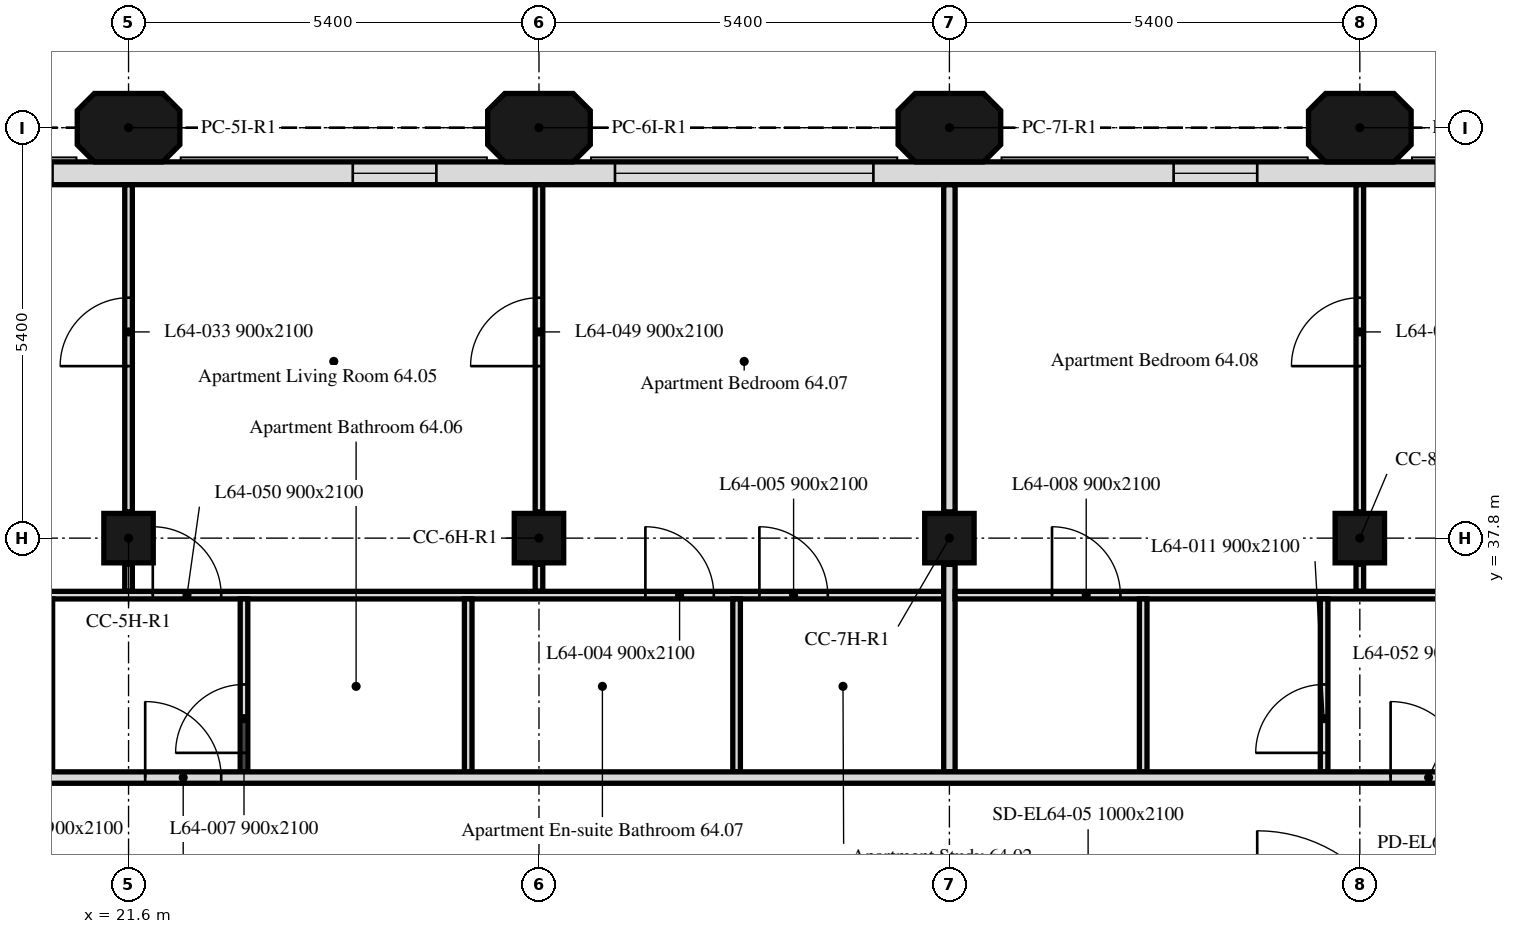
"""IFC4 building model, lengths in metres.
Left out: names, types, materials, properties, quantities, classifications, styles, units other than length and angle.
Written with IfcOpenShell. Run it as: python <this file> out.ifc"""

import sys

from ifc_helpers import new_model, si_unit, direction, frame, frame_2d, origin, origin_2d, place, context, subcontext, project, spatial, polyline, rectangle, outline, extrude, element, fill, save


model = new_model("IFC4")
c1 = context("Model", 3, precision=1e-05, world=origin(), true_north=direction((0.0, 1.0)))
c2 = subcontext(c1, "Body", "Model", "MODEL_VIEW")
j1 = project(units=[si_unit("LENGTHUNIT", "METRE"), si_unit("PLANEANGLEUNIT", "RADIAN")], contexts=[c1])
p1 = place(None, origin())
s1 = spatial("IfcSite", under=j1, at=p1, CompositionType="ELEMENT")
p2 = place(p1, origin())
s2 = spatial("IfcBuilding", under=s1, at=p2, CompositionType="ELEMENT")
p3 = place(p2, frame((0.0, 0.0, 265.3)))
s3 = spatial("IfcBuildingStorey", under=s2, at=p3, CompositionType="ELEMENT", Elevation=265.3)
for number, where, z_axis, x_axis in (
    (1, (21.6, 37.8, 0.0), (0.0, 0.0, 1.0), (1.0, 0.0, 0.0)),
    (2, (27.0, 37.8, 0.0), (0.0, 0.0, 1.0), (1.0, 0.0, 0.0)),
    (3, (32.4, 37.8, 0.0), (0.0, 0.0, 1.0), (1.0, 0.0, 0.0)),
    (4, (37.8, 37.8, 0.0), (0.0, 0.0, 1.0), (1.0, 0.0, 0.0)),
):
    element("IfcColumn", number, at=place(p3, frame(where, z_axis=z_axis, x_axis=x_axis)), inside=s3, PredefinedType="COLUMN", context=c2, shape_type="SweptSolid", body=[
        extrude(rectangle(XDim=0.65, YDim=0.65, at=origin_2d()), origin(), (0.0, 0.0, 1.0), 3.0),
    ])
for number, where, z_axis, x_axis in (
    (5, (21.6, 43.2, 0.0), (0.0, 0.0, 1.0), (1.0, 0.0, 0.0)),
    (6, (27.0, 43.2, 0.0), (0.0, 0.0, 1.0), (1.0, 0.0, 0.0)),
    (7, (32.4, 43.2, 0.0), (0.0, 0.0, 1.0), (1.0, 0.0, 0.0)),
    (8, (37.8, 43.2, 0.0), (0.0, 0.0, 1.0), (1.0, 0.0, 0.0)),
):
    element("IfcColumn", number, at=place(p3, frame(where, z_axis=z_axis, x_axis=x_axis)), inside=s3, PredefinedType="COLUMN", context=c2, shape_type="SweptSolid", body=[
        extrude(outline(polyline([(-0.45, -0.45), (0.45, -0.45), (0.675, -0.225), (0.675, 0.225), (0.45, 0.45), (-0.45, 0.45), (-0.675, 0.225), (-0.675, -0.225), (-0.45, -0.45)])), origin(), (0.0, 0.0, 1.0), 3.0),
    ])
p4 = place(p3, frame((43.014, 42.6, 0.0), z_axis=(0.0, 0.0, 1.0), x_axis=(-1.0, 0.0, 0.0)))
e9 = element("IfcWall", 9, at=p4, inside=s3, PredefinedType="SOLIDWALL", context=c2, shape_type="SweptSolid", body=[
    extrude(rectangle(XDim=32.027, YDim=0.3, at=frame_2d((16.014, 0.0))), origin(), (0.0, 0.0, 1.0), 3.0),
])
p5 = place(p4, frame((0.814, 0.0, 0.9)))
e10 = element("IfcOpeningElement", 10, at=p5, cuts=e9, PredefinedType="OPENING", context=c2, shape_type="SweptSolid", body=[
    extrude(rectangle(XDim=3.4, YDim=1.7, at=frame_2d((1.7, 0.85))), frame((0.0, 0.16, 0.0), z_axis=(0.0, -1.0, 0.0), x_axis=(1.0, 0.0, 0.0)), (0.0, 0.0, 1.0), 0.32),
])
p6 = place(p4, frame((6.564, 0.0, 0.9)))
e11 = element("IfcOpeningElement", 11, at=p6, cuts=e9, PredefinedType="OPENING", context=c2, shape_type="SweptSolid", body=[
    extrude(rectangle(XDim=1.1, YDim=1.7, at=frame_2d((0.55, 0.85))), frame((0.0, 0.16, 0.0), z_axis=(0.0, -1.0, 0.0), x_axis=(1.0, 0.0, 0.0)), (0.0, 0.0, 1.0), 0.32),
])
p7 = place(p4, frame((11.614, 0.0, 0.9)))
e12 = element("IfcOpeningElement", 12, at=p7, cuts=e9, PredefinedType="OPENING", context=c2, shape_type="SweptSolid", body=[
    extrude(rectangle(XDim=3.4, YDim=1.7, at=frame_2d((1.7, 0.85))), frame((0.0, 0.16, 0.0), z_axis=(0.0, -1.0, 0.0), x_axis=(1.0, 0.0, 0.0)), (0.0, 0.0, 1.0), 0.32),
])
p8 = place(p4, frame((17.364, 0.0, 0.9)))
e13 = element("IfcOpeningElement", 13, at=p8, cuts=e9, PredefinedType="OPENING", context=c2, shape_type="SweptSolid", body=[
    extrude(rectangle(XDim=1.1, YDim=1.7, at=frame_2d((0.55, 0.85))), frame((0.0, 0.16, 0.0), z_axis=(0.0, -1.0, 0.0), x_axis=(1.0, 0.0, 0.0)), (0.0, 0.0, 1.0), 0.32),
])
p9 = place(p4, frame((22.414, 0.0, 0.9)))
e14 = element("IfcOpeningElement", 14, at=p9, cuts=e9, PredefinedType="OPENING", context=c2, shape_type="SweptSolid", body=[
    extrude(rectangle(XDim=3.4, YDim=1.7, at=frame_2d((1.7, 0.85))), frame((0.0, 0.16, 0.0), z_axis=(0.0, -1.0, 0.0), x_axis=(1.0, 0.0, 0.0)), (0.0, 0.0, 1.0), 0.32),
])
p10 = place(p4, frame((28.164, 0.0, 0.9)))
e15 = element("IfcOpeningElement", 15, at=p10, cuts=e9, PredefinedType="OPENING", context=c2, shape_type="SweptSolid", body=[
    extrude(rectangle(XDim=1.1, YDim=1.7, at=frame_2d((0.55, 0.85))), frame((0.0, 0.16, 0.0), z_axis=(0.0, -1.0, 0.0), x_axis=(1.0, 0.0, 0.0)), (0.0, 0.0, 1.0), 0.32),
])
p11 = place(p3, frame((21.6, 37.1, 0.0), z_axis=(0.0, 0.0, 1.0), x_axis=(0.0, 1.0, 0.0)))
e16 = element("IfcWall", 16, at=p11, inside=s3, PredefinedType="PARTITIONING", context=c2, shape_type="SweptSolid", body=[
    extrude(rectangle(XDim=0.355, YDim=0.1, at=frame_2d((0.177, 0.0))), origin(), (0.0, 0.0, 1.0), 3.0),
])
p12 = place(p3, frame((21.6, 38.145, 0.0), z_axis=(0.0, 0.0, 1.0), x_axis=(0.0, 1.0, 0.0)))
e17 = element("IfcWall", 17, at=p12, inside=s3, PredefinedType="PARTITIONING", context=c2, shape_type="SweptSolid", body=[
    extrude(rectangle(XDim=4.304, YDim=0.1, at=frame_2d((2.152, 0.0))), origin(), (0.0, 0.0, 1.0), 3.0),
])
p13 = place(p12, frame((1.918, 0.0, 0.0)))
e18 = element("IfcOpeningElement", 18, at=p13, cuts=e17, PredefinedType="OPENING", context=c2, shape_type="SweptSolid", body=[
    extrude(rectangle(XDim=0.9, YDim=2.1, at=frame_2d((0.45, 1.05))), frame((0.0, 0.05, 0.0), z_axis=(0.0, -1.0, 0.0), x_axis=(1.0, 0.0, 0.0)), (0.0, 0.0, 1.0), 0.1),
])
p14 = place(p3, frame((27.0, 37.1, 0.0), z_axis=(0.0, 0.0, 1.0), x_axis=(0.0, 1.0, 0.0)))
e19 = element("IfcWall", 19, at=p14, inside=s3, PredefinedType="PARTITIONING", context=c2, shape_type="SweptSolid", body=[
    extrude(rectangle(XDim=0.355, YDim=0.1, at=frame_2d((0.177, 0.0))), origin(), (0.0, 0.0, 1.0), 3.0),
])
p15 = place(p3, frame((27.0, 38.145, 0.0), z_axis=(0.0, 0.0, 1.0), x_axis=(0.0, 1.0, 0.0)))
e20 = element("IfcWall", 20, at=p15, inside=s3, PredefinedType="PARTITIONING", context=c2, shape_type="SweptSolid", body=[
    extrude(rectangle(XDim=4.304, YDim=0.1, at=frame_2d((2.152, 0.0))), origin(), (0.0, 0.0, 1.0), 3.0),
])
p16 = place(p15, frame((1.918, 0.0, 0.0)))
e21 = element("IfcOpeningElement", 21, at=p16, cuts=e20, PredefinedType="OPENING", context=c2, shape_type="SweptSolid", body=[
    extrude(rectangle(XDim=0.9, YDim=2.1, at=frame_2d((0.45, 1.05))), frame((0.0, 0.05, 0.0), z_axis=(0.0, -1.0, 0.0), x_axis=(1.0, 0.0, 0.0)), (0.0, 0.0, 1.0), 0.1),
])
p17 = place(p3, frame((32.4, 38.145, 0.0), z_axis=(0.0, 0.0, 1.0), x_axis=(0.0, 1.0, 0.0)))
e22 = element("IfcWall", 22, at=p17, inside=s3, PredefinedType="PARTITIONING", context=c2, shape_type="SweptSolid", body=[
    extrude(rectangle(XDim=4.304, YDim=0.15, at=frame_2d((2.152, 0.0))), origin(), (0.0, 0.0, 1.0), 3.0),
])
p18 = place(p3, frame((16.275, 37.05, 0.0), z_axis=(0.0, 0.0, 1.0), x_axis=(1.0, 0.0, 0.0)))
e23 = element("IfcWall", 23, at=p18, inside=s3, PredefinedType="PARTITIONING", context=c2, shape_type="SweptSolid", body=[
    extrude(rectangle(XDim=16.05, YDim=0.1, at=frame_2d((8.025, 0.0))), origin(), (0.0, 0.0, 1.0), 3.0),
])
p19 = place(p18, frame((1.453, 0.0, 0.0)))
e24 = element("IfcOpeningElement", 24, at=p19, cuts=e23, PredefinedType="OPENING", context=c2, shape_type="SweptSolid", body=[
    extrude(rectangle(XDim=0.9, YDim=2.1, at=frame_2d((0.45, 1.05))), frame((0.0, 0.05, 0.0), z_axis=(0.0, -1.0, 0.0), x_axis=(1.0, 0.0, 0.0)), (0.0, 0.0, 1.0), 0.1),
])
p20 = place(p18, frame((12.125, 0.0, 0.0)))
e25 = element("IfcOpeningElement", 25, at=p20, cuts=e23, PredefinedType="OPENING", context=c2, shape_type="SweptSolid", body=[
    extrude(rectangle(XDim=0.9, YDim=2.1, at=frame_2d((0.45, 1.05))), frame((0.0, 0.05, 0.0), z_axis=(0.0, -1.0, 0.0), x_axis=(1.0, 0.0, 0.0)), (0.0, 0.0, 1.0), 0.1),
])
p21 = place(p18, frame((13.625, 0.0, 0.0)))
e26 = element("IfcOpeningElement", 26, at=p21, cuts=e23, PredefinedType="OPENING", context=c2, shape_type="SweptSolid", body=[
    extrude(rectangle(XDim=0.9, YDim=2.1, at=frame_2d((0.45, 1.05))), frame((0.0, 0.05, 0.0), z_axis=(0.0, -1.0, 0.0), x_axis=(1.0, 0.0, 0.0)), (0.0, 0.0, 1.0), 0.1),
])
p22 = place(p18, frame((5.644, 0.0, 0.0)))
e27 = element("IfcOpeningElement", 27, at=p22, cuts=e23, PredefinedType="OPENING", context=c2, shape_type="SweptSolid", body=[
    extrude(rectangle(XDim=0.9, YDim=2.1, at=frame_2d((0.45, 1.05))), frame((0.0, 0.05, 0.0), z_axis=(0.0, -1.0, 0.0), x_axis=(1.0, 0.0, 0.0)), (0.0, 0.0, 1.0), 0.1),
])
p23 = place(p3, frame((20.551, 34.725, 0.0), z_axis=(0.0, 0.0, 1.0), x_axis=(0.0, 1.0, 0.0)))
e28 = element("IfcWall", 28, at=p23, inside=s3, PredefinedType="PARTITIONING", context=c2, shape_type="SweptSolid", body=[
    extrude(rectangle(XDim=2.275, YDim=0.1, at=frame_2d((1.137, 0.0))), origin(), (0.0, 0.0, 1.0), 3.0),
])
p24 = place(p23, frame((0.25, 0.0, 0.0)))
e29 = element("IfcOpeningElement", 29, at=p24, cuts=e28, PredefinedType="OPENING", context=c2, shape_type="SweptSolid", body=[
    extrude(rectangle(XDim=0.9, YDim=2.1, at=frame_2d((0.45, 1.05))), frame((0.0, 0.05, 0.0), z_axis=(0.0, -1.0, 0.0), x_axis=(1.0, 0.0, 0.0)), (0.0, 0.0, 1.0), 0.1),
])
p25 = place(p3, frame((23.119, 34.725, 0.0), z_axis=(0.0, 0.0, 1.0), x_axis=(0.0, 1.0, 0.0)))
e30 = element("IfcWall", 30, at=p25, inside=s3, PredefinedType="PARTITIONING", context=c2, shape_type="SweptSolid", body=[
    extrude(rectangle(XDim=2.275, YDim=0.1, at=frame_2d((1.137, 0.0))), origin(), (0.0, 0.0, 1.0), 3.0),
])
p26 = place(p25, frame((0.25, 0.0, 0.0)))
e31 = element("IfcOpeningElement", 31, at=p26, cuts=e30, PredefinedType="OPENING", context=c2, shape_type="SweptSolid", body=[
    extrude(rectangle(XDim=0.9, YDim=2.1, at=frame_2d((0.45, 1.05))), frame((0.0, 0.05, 0.0), z_axis=(0.0, -1.0, 0.0), x_axis=(1.0, 0.0, 0.0)), (0.0, 0.0, 1.0), 0.1),
])
for number, where, z_axis, x_axis in (
    (32, (26.069, 34.725, 0.0), (0.0, 0.0, 1.0), (0.0, 1.0, 0.0)),
    (33, (29.6, 34.725, 0.0), (0.0, 0.0, 1.0), (0.0, 1.0, 0.0)),
):
    element("IfcWall", number, at=place(p3, frame(where, z_axis=z_axis, x_axis=x_axis)), inside=s3, PredefinedType="PARTITIONING", context=c2, shape_type="SweptSolid", body=[
        extrude(rectangle(XDim=2.275, YDim=0.1, at=frame_2d((1.137, 0.0))), origin(), (0.0, 0.0, 1.0), 3.0),
    ])
p27 = place(p3, frame((32.4, 34.725, 0.0), z_axis=(0.0, 0.0, 1.0), x_axis=(0.0, 1.0, 0.0)))
e34 = element("IfcWall", 34, at=p27, inside=s3, PredefinedType="PARTITIONING", context=c2, shape_type="SweptSolid", body=[
    extrude(rectangle(XDim=2.73, YDim=0.15, at=frame_2d((1.365, 0.0))), origin(), (0.0, 0.0, 1.0), 3.0),
])
p28 = place(p3, frame((37.8, 37.1, 0.0), z_axis=(0.0, 0.0, 1.0), x_axis=(0.0, 1.0, 0.0)))
e35 = element("IfcWall", 35, at=p28, inside=s3, PredefinedType="PARTITIONING", context=c2, shape_type="SweptSolid", body=[
    extrude(rectangle(XDim=0.355, YDim=0.1, at=frame_2d((0.177, 0.0))), origin(), (0.0, 0.0, 1.0), 3.0),
])
p29 = place(p3, frame((37.8, 38.145, 0.0), z_axis=(0.0, 0.0, 1.0), x_axis=(0.0, 1.0, 0.0)))
e36 = element("IfcWall", 36, at=p29, inside=s3, PredefinedType="PARTITIONING", context=c2, shape_type="SweptSolid", body=[
    extrude(rectangle(XDim=4.304, YDim=0.1, at=frame_2d((2.152, 0.0))), origin(), (0.0, 0.0, 1.0), 3.0),
])
p30 = place(p29, frame((1.918, 0.0, 0.0)))
e37 = element("IfcOpeningElement", 37, at=p30, cuts=e36, PredefinedType="OPENING", context=c2, shape_type="SweptSolid", body=[
    extrude(rectangle(XDim=0.9, YDim=2.1, at=frame_2d((0.45, 1.05))), frame((0.0, 0.05, 0.0), z_axis=(0.0, -1.0, 0.0), x_axis=(1.0, 0.0, 0.0)), (0.0, 0.0, 1.0), 0.1),
])
p31 = place(p3, frame((32.475, 37.05, 0.0), z_axis=(0.0, 0.0, 1.0), x_axis=(1.0, 0.0, 0.0)))
e38 = element("IfcWall", 38, at=p31, inside=s3, PredefinedType="PARTITIONING", context=c2, shape_type="SweptSolid", body=[
    extrude(rectangle(XDim=10.485, YDim=0.1, at=frame_2d((5.242, 0.0))), origin(), (0.0, 0.0, 1.0), 3.0),
])
p32 = place(p31, frame((1.275, 0.0, 0.0)))
e39 = element("IfcOpeningElement", 39, at=p32, cuts=e38, PredefinedType="OPENING", context=c2, shape_type="SweptSolid", body=[
    extrude(rectangle(XDim=0.9, YDim=2.1, at=frame_2d((0.45, 1.05))), frame((0.0, 0.05, 0.0), z_axis=(0.0, -1.0, 0.0), x_axis=(1.0, 0.0, 0.0)), (0.0, 0.0, 1.0), 0.1),
])
p33 = place(p31, frame((6.535, 0.0, 0.0)))
e40 = element("IfcOpeningElement", 40, at=p33, cuts=e38, PredefinedType="OPENING", context=c2, shape_type="SweptSolid", body=[
    extrude(rectangle(XDim=0.9, YDim=2.1, at=frame_2d((0.45, 1.05))), frame((0.0, 0.05, 0.0), z_axis=(0.0, -1.0, 0.0), x_axis=(1.0, 0.0, 0.0)), (0.0, 0.0, 1.0), 0.1),
])
p34 = place(p3, frame((34.95, 34.725, 0.0), z_axis=(0.0, 0.0, 1.0), x_axis=(0.0, 1.0, 0.0)))
e41 = element("IfcWall", 41, at=p34, inside=s3, PredefinedType="PARTITIONING", context=c2, shape_type="SweptSolid", body=[
    extrude(rectangle(XDim=2.275, YDim=0.1, at=frame_2d((1.137, 0.0))), origin(), (0.0, 0.0, 1.0), 3.0),
])
p35 = place(p3, frame((37.33, 34.725, 0.0), z_axis=(0.0, 0.0, 1.0), x_axis=(0.0, 1.0, 0.0)))
e42 = element("IfcWall", 42, at=p35, inside=s3, PredefinedType="PARTITIONING", context=c2, shape_type="SweptSolid", body=[
    extrude(rectangle(XDim=2.275, YDim=0.1, at=frame_2d((1.137, 0.0))), origin(), (0.0, 0.0, 1.0), 3.0),
])
p36 = place(p35, frame((0.25, 0.0, 0.0)))
e43 = element("IfcOpeningElement", 43, at=p36, cuts=e42, PredefinedType="OPENING", context=c2, shape_type="SweptSolid", body=[
    extrude(rectangle(XDim=0.9, YDim=2.1, at=frame_2d((0.45, 1.05))), frame((0.0, 0.05, 0.0), z_axis=(0.0, -1.0, 0.0), x_axis=(1.0, 0.0, 0.0)), (0.0, 0.0, 1.0), 0.1),
])
p37 = place(p3, frame((6.151, 34.65, 0.0), z_axis=(0.0, 0.0, 1.0), x_axis=(1.0, 0.0, 0.0)))
e44 = element("IfcWall", 44, at=p37, inside=s3, PredefinedType="PARTITIONING", context=c2, shape_type="SweptSolid", body=[
    extrude(rectangle(XDim=41.698, YDim=0.15, at=frame_2d((20.849, 0.0))), origin(), (0.0, 0.0, 1.0), 3.0),
])
p38 = place(p37, frame((2.969, 0.0, 0.0)))
e45 = element("IfcOpeningElement", 45, at=p38, cuts=e44, PredefinedType="OPENING", context=c2, shape_type="SweptSolid", body=[
    extrude(rectangle(XDim=1.0, YDim=2.1, at=frame_2d((0.5, 1.05))), frame((0.0, 0.075, 0.0), z_axis=(0.0, -1.0, 0.0), x_axis=(1.0, 0.0, 0.0)), (0.0, 0.0, 1.0), 0.15),
])
p39 = place(p37, frame((15.668, 0.0, 0.0)))
e46 = element("IfcOpeningElement", 46, at=p39, cuts=e44, PredefinedType="OPENING", context=c2, shape_type="SweptSolid", body=[
    extrude(rectangle(XDim=1.0, YDim=2.1, at=frame_2d((0.5, 1.05))), frame((0.0, 0.075, 0.0), z_axis=(0.0, -1.0, 0.0), x_axis=(1.0, 0.0, 0.0)), (0.0, 0.0, 1.0), 0.15),
])
p40 = place(p37, frame((32.054, 0.0, 0.0)))
e47 = element("IfcOpeningElement", 47, at=p40, cuts=e44, PredefinedType="OPENING", context=c2, shape_type="SweptSolid", body=[
    extrude(rectangle(XDim=1.0, YDim=2.1, at=frame_2d((0.5, 1.05))), frame((0.0, 0.075, 0.0), z_axis=(0.0, -1.0, 0.0), x_axis=(1.0, 0.0, 0.0)), (0.0, 0.0, 1.0), 0.15),
])
p41 = place(p6, origin())
e48 = element("IfcWindow", 48, at=p41, inside=s3, PartitioningType="SINGLE_PANEL", PredefinedType="WINDOW", context=c2, shape_type="SweptSolid", body=[
    extrude(rectangle(XDim=1.1, YDim=1.7, at=frame_2d((0.55, 0.85))), frame((0.0, 0.03, 0.0), z_axis=(0.0, -1.0, 0.0), x_axis=(1.0, 0.0, 0.0)), (0.0, 0.0, 1.0), 0.06),
])
fill(e11, e48)
p42 = place(p7, origin())
e49 = element("IfcWindow", 49, at=p42, inside=s3, PartitioningType="SINGLE_PANEL", PredefinedType="WINDOW", context=c2, shape_type="SweptSolid", body=[
    extrude(rectangle(XDim=3.4, YDim=1.7, at=frame_2d((1.7, 0.85))), frame((0.0, 0.03, 0.0), z_axis=(0.0, -1.0, 0.0), x_axis=(1.0, 0.0, 0.0)), (0.0, 0.0, 1.0), 0.06),
])
fill(e12, e49)
p43 = place(p8, origin())
e50 = element("IfcWindow", 50, at=p43, inside=s3, PartitioningType="SINGLE_PANEL", PredefinedType="WINDOW", context=c2, shape_type="SweptSolid", body=[
    extrude(rectangle(XDim=1.1, YDim=1.7, at=frame_2d((0.55, 0.85))), frame((0.0, 0.03, 0.0), z_axis=(0.0, -1.0, 0.0), x_axis=(1.0, 0.0, 0.0)), (0.0, 0.0, 1.0), 0.06),
])
fill(e13, e50)
p44 = place(p20, origin())
e51 = element("IfcDoor", 51, at=p44, inside=s3, OperationType="SINGLE_SWING_LEFT", PredefinedType="DOOR", context=c2, shape_type="SweptSolid", body=[
    extrude(rectangle(XDim=0.9, YDim=2.1, at=frame_2d((0.45, 1.05))), frame((0.0, 0.025, 0.0), z_axis=(0.0, -1.0, 0.0), x_axis=(1.0, 0.0, 0.0)), (0.0, 0.0, 1.0), 0.05),
])
fill(e25, e51)
p45 = place(p21, origin())
e52 = element("IfcDoor", 52, at=p45, inside=s3, OperationType="SINGLE_SWING_RIGHT", PredefinedType="DOOR", context=c2, shape_type="SweptSolid", body=[
    extrude(rectangle(XDim=0.9, YDim=2.1, at=frame_2d((0.45, 1.05))), frame((0.0, 0.025, 0.0), z_axis=(0.0, -1.0, 0.0), x_axis=(1.0, 0.0, 0.0)), (0.0, 0.0, 1.0), 0.05),
])
fill(e26, e52)
p46 = place(p26, origin())
e53 = element("IfcDoor", 53, at=p46, inside=s3, OperationType="SINGLE_SWING_LEFT", PredefinedType="DOOR", context=c2, shape_type="SweptSolid", body=[
    extrude(rectangle(XDim=0.9, YDim=2.1, at=frame_2d((0.45, 1.05))), frame((0.0, 0.025, 0.0), z_axis=(0.0, -1.0, 0.0), x_axis=(1.0, 0.0, 0.0)), (0.0, 0.0, 1.0), 0.05),
])
fill(e31, e53)
p47 = place(p32, origin())
e54 = element("IfcDoor", 54, at=p47, inside=s3, OperationType="SINGLE_SWING_RIGHT", PredefinedType="DOOR", context=c2, shape_type="SweptSolid", body=[
    extrude(rectangle(XDim=0.9, YDim=2.1, at=frame_2d((0.45, 1.05))), frame((0.0, 0.025, 0.0), z_axis=(0.0, -1.0, 0.0), x_axis=(1.0, 0.0, 0.0)), (0.0, 0.0, 1.0), 0.05),
])
fill(e39, e54)
p48 = place(p36, origin())
e55 = element("IfcDoor", 55, at=p48, inside=s3, OperationType="SINGLE_SWING_LEFT", PredefinedType="DOOR", context=c2, shape_type="SweptSolid", body=[
    extrude(rectangle(XDim=0.9, YDim=2.1, at=frame_2d((0.45, 1.05))), frame((0.0, 0.025, 0.0), z_axis=(0.0, -1.0, 0.0), x_axis=(1.0, 0.0, 0.0)), (0.0, 0.0, 1.0), 0.05),
])
fill(e43, e55)
p49 = place(p13, origin())
e56 = element("IfcDoor", 56, at=p49, inside=s3, OperationType="SINGLE_SWING_LEFT", PredefinedType="DOOR", context=c2, shape_type="SweptSolid", body=[
    extrude(rectangle(XDim=0.9, YDim=2.1, at=frame_2d((0.45, 1.05))), frame((0.0, 0.025, 0.0), z_axis=(0.0, -1.0, 0.0), x_axis=(1.0, 0.0, 0.0)), (0.0, 0.0, 1.0), 0.05),
])
fill(e18, e56)
p50 = place(p30, origin())
e57 = element("IfcDoor", 57, at=p50, inside=s3, OperationType="SINGLE_SWING_RIGHT", PredefinedType="DOOR", context=c2, shape_type="SweptSolid", body=[
    extrude(rectangle(XDim=0.9, YDim=2.1, at=frame_2d((0.45, 1.05))), frame((0.0, 0.025, 0.0), z_axis=(0.0, -1.0, 0.0), x_axis=(1.0, 0.0, 0.0)), (0.0, 0.0, 1.0), 0.05),
])
fill(e37, e57)
p51 = place(p16, origin())
e58 = element("IfcDoor", 58, at=p51, inside=s3, OperationType="SINGLE_SWING_RIGHT", PredefinedType="DOOR", context=c2, shape_type="SweptSolid", body=[
    extrude(rectangle(XDim=0.9, YDim=2.1, at=frame_2d((0.45, 1.05))), frame((0.0, 0.025, 0.0), z_axis=(0.0, -1.0, 0.0), x_axis=(1.0, 0.0, 0.0)), (0.0, 0.0, 1.0), 0.05),
])
fill(e21, e58)
p52 = place(p22, origin())
e59 = element("IfcDoor", 59, at=p52, inside=s3, OperationType="SINGLE_SWING_RIGHT", PredefinedType="DOOR", context=c2, shape_type="SweptSolid", body=[
    extrude(rectangle(XDim=0.9, YDim=2.1, at=frame_2d((0.45, 1.05))), frame((0.0, 0.025, 0.0), z_axis=(0.0, -1.0, 0.0), x_axis=(1.0, 0.0, 0.0)), (0.0, 0.0, 1.0), 0.05),
])
fill(e27, e59)
p53 = place(p39, origin())
e60 = element("IfcDoor", 60, at=p53, inside=s3, OperationType="SINGLE_SWING_LEFT", PredefinedType="DOOR", context=c2, shape_type="SweptSolid", body=[
    extrude(rectangle(XDim=1.0, YDim=2.1, at=frame_2d((0.5, 1.05))), frame((0.0, 0.025, 0.0), z_axis=(0.0, -1.0, 0.0), x_axis=(1.0, 0.0, 0.0)), (0.0, 0.0, 1.0), 0.05),
])
fill(e46, e60)
p54 = place(p40, origin())
e61 = element("IfcDoor", 61, at=p54, inside=s3, OperationType="SINGLE_SWING_RIGHT", PredefinedType="DOOR", context=c2, shape_type="SweptSolid", body=[
    extrude(rectangle(XDim=1.0, YDim=2.1, at=frame_2d((0.5, 1.05))), frame((0.0, 0.025, 0.0), z_axis=(0.0, -1.0, 0.0), x_axis=(1.0, 0.0, 0.0)), (0.0, 0.0, 1.0), 0.05),
])
fill(e47, e61)
save(model, sys.argv[1])
